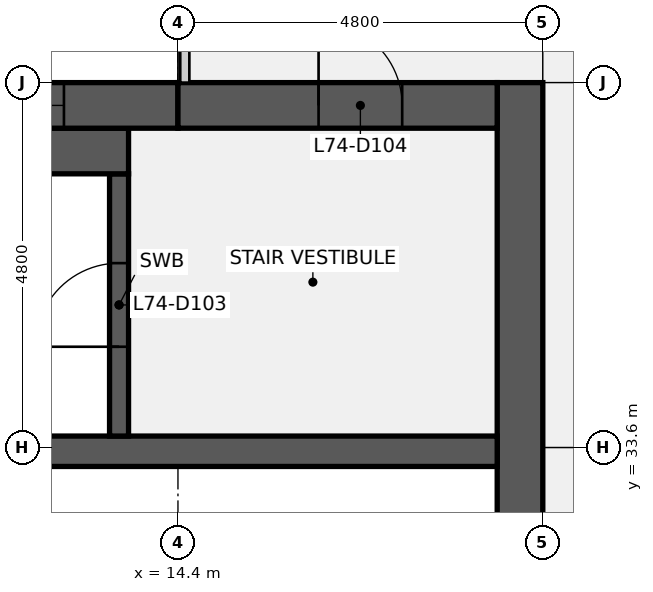
"""IFC4 building model, lengths in metres.
Left out: names, types, materials, properties, quantities, classifications, styles, units other than length and angle.
Written with IfcOpenShell. Run it as: python <this file> out.ifc"""

import sys

from ifc_helpers import new_model, si_unit, direction, frame, frame_2d, origin, place, context, subcontext, project, spatial, rectangle, extrude, element, fill, save


model = new_model("IFC4")
c1 = context("Model", 3, precision=1e-05, world=origin(), true_north=direction((0.0, 1.0)))
c2 = subcontext(c1, "Body", "Model", "MODEL_VIEW")
j1 = project(units=[si_unit("LENGTHUNIT", "METRE"), si_unit("PLANEANGLEUNIT", "RADIAN")], contexts=[c1])
p1 = place(None, origin())
s1 = spatial("IfcSite", under=j1, at=p1, CompositionType="ELEMENT")
p2 = place(p1, origin())
s2 = spatial("IfcBuilding", under=s1, at=p2, CompositionType="ELEMENT")
p3 = place(p2, frame((0.0, 0.0, 334.3)))
s3 = spatial("IfcBuildingStorey", under=s2, at=p3, CompositionType="ELEMENT", Elevation=334.3)
p4 = place(p3, frame((18.9, 38.4, 0.0), z_axis=(0.0, 0.0, 1.0), x_axis=(0.0, -1.0, 0.0)))
e1 = element("IfcWall", 1, at=p4, inside=s3, PredefinedType="SHEAR", context=c2, shape_type="SweptSolid", body=[
    extrude(rectangle(XDim=28.8, YDim=0.6, at=frame_2d((14.4, 0.0))), origin(), (0.0, 0.0, 1.0), 3.84),
])
p5 = place(p4, frame((18.3, 0.0, 0.0)))
e2 = element("IfcOpeningElement", 2, at=p5, cuts=e1, PredefinedType="OPENING", context=c2, shape_type="SweptSolid", body=[
    extrude(rectangle(XDim=1.8, YDim=2.1, at=frame_2d((0.9, 1.05))), frame((0.0, 0.31, 0.0), z_axis=(0.0, -1.0, 0.0), x_axis=(1.0, 0.0, 0.0)), (0.0, 0.0, 1.0), 0.62),
])
p6 = place(p4, frame((8.7, 0.0, 0.0)))
e3 = element("IfcOpeningElement", 3, at=p6, cuts=e1, PredefinedType="OPENING", context=c2, shape_type="SweptSolid", body=[
    extrude(rectangle(XDim=1.8, YDim=2.1, at=frame_2d((0.9, 1.05))), frame((0.0, 0.31, 0.0), z_axis=(0.0, -1.0, 0.0), x_axis=(1.0, 0.0, 0.0)), (0.0, 0.0, 1.0), 0.62),
])
p7 = place(p3, frame((0.6, 33.55, 0.0), z_axis=(0.0, 0.0, 1.0), x_axis=(1.0, 0.0, 0.0)))
e4 = element("IfcWall", 4, at=p7, inside=s3, PredefinedType="SHEAR", context=c2, shape_type="SweptSolid", body=[
    extrude(rectangle(XDim=18.0, YDim=0.4, at=frame_2d((9.0, 0.0))), origin(), (0.0, 0.0, 1.0), 3.84),
])
p8 = place(p3, frame((13.625, 33.75, 0.0), z_axis=(0.0, 0.0, 1.0), x_axis=(0.0, 1.0, 0.0)))
e5 = element("IfcWall", 5, at=p8, inside=s3, PredefinedType="SHEAR", context=c2, shape_type="SweptSolid", body=[
    extrude(rectangle(XDim=3.45, YDim=0.25, at=frame_2d((1.725, 0.0))), origin(), (0.0, 0.0, 1.0), 3.84),
])
p9 = place(p8, frame((1.175, 0.0, 0.0)))
e6 = element("IfcOpeningElement", 6, at=p9, cuts=e5, PredefinedType="OPENING", context=c2, shape_type="SweptSolid", body=[
    extrude(rectangle(XDim=1.1, YDim=2.1, at=frame_2d((0.55, 1.05))), frame((0.0, 0.135, 0.0), z_axis=(0.0, -1.0, 0.0), x_axis=(1.0, 0.0, 0.0)), (0.0, 0.0, 1.0), 0.27),
])
p10 = place(p3, frame((6.25, 37.5, 0.0), z_axis=(0.0, 0.0, 1.0), x_axis=(1.0, 0.0, 0.0)))
e7 = element("IfcWall", 7, at=p10, inside=s3, PredefinedType="SHEAR", context=c2, shape_type="SweptSolid", body=[
    extrude(rectangle(XDim=7.5, YDim=0.6, at=frame_2d((3.75, 0.0))), origin(), (0.0, 0.0, 1.0), 3.84),
])
p11 = place(p3, frame((0.6, 38.1, 0.0), z_axis=(0.0, 0.0, 1.0), x_axis=(1.0, 0.0, 0.0)))
e8 = element("IfcWall", 8, at=p11, inside=s3, PredefinedType="SHEAR", context=c2, shape_type="SweptSolid", body=[
    extrude(rectangle(XDim=13.8, YDim=0.6, at=frame_2d((6.9, 0.0))), origin(), (0.0, 0.0, 1.0), 3.84),
])
p12 = place(p11, frame((5.7, 0.0, 0.9)))
e9 = element("IfcOpeningElement", 9, at=p12, cuts=e8, PredefinedType="OPENING", context=c2, shape_type="SweptSolid", body=[
    extrude(rectangle(XDim=1.8, YDim=1.5, at=frame_2d((0.9, 0.75))), frame((0.0, 0.31, 0.0), z_axis=(0.0, -1.0, 0.0), x_axis=(1.0, 0.0, 0.0)), (0.0, 0.0, 1.0), 0.62),
])
p13 = place(p11, frame((10.5, 0.0, 0.9)))
e10 = element("IfcOpeningElement", 10, at=p13, cuts=e8, PredefinedType="OPENING", context=c2, shape_type="SweptSolid", body=[
    extrude(rectangle(XDim=1.8, YDim=1.5, at=frame_2d((0.9, 0.75))), frame((0.0, 0.31, 0.0), z_axis=(0.0, -1.0, 0.0), x_axis=(1.0, 0.0, 0.0)), (0.0, 0.0, 1.0), 0.62),
])
p14 = place(p3, frame((14.4, 38.1, 0.0), z_axis=(0.0, 0.0, 1.0), x_axis=(1.0, 0.0, 0.0)))
e11 = element("IfcWall", 11, at=p14, inside=s3, PredefinedType="SHEAR", context=c2, shape_type="SweptSolid", body=[
    extrude(rectangle(XDim=4.2, YDim=0.6, at=frame_2d((2.1, 0.0))), origin(), (0.0, 0.0, 1.0), 3.84),
])
p15 = place(p14, frame((1.85, 0.0, 0.0)))
e12 = element("IfcOpeningElement", 12, at=p15, cuts=e11, PredefinedType="OPENING", context=c2, shape_type="SweptSolid", body=[
    extrude(rectangle(XDim=1.1, YDim=2.1, at=frame_2d((0.55, 1.05))), frame((0.0, 0.31, 0.0), z_axis=(0.0, -1.0, 0.0), x_axis=(1.0, 0.0, 0.0)), (0.0, 0.0, 1.0), 0.62),
])
p16 = place(p9, origin())
e13 = element("IfcDoor", 13, at=p16, inside=s3, OperationType="SINGLE_SWING_LEFT", PredefinedType="DOOR", context=c2, shape_type="SweptSolid", body=[
    extrude(rectangle(XDim=1.1, YDim=2.1, at=frame_2d((0.55, 1.05))), frame((0.0, 0.025, 0.0), z_axis=(0.0, -1.0, 0.0), x_axis=(1.0, 0.0, 0.0)), (0.0, 0.0, 1.0), 0.05),
])
fill(e6, e13)
p17 = place(p15, origin())
e14 = element("IfcDoor", 14, at=p17, inside=s3, OperationType="SINGLE_SWING_LEFT", PredefinedType="DOOR", context=c2, shape_type="SweptSolid", body=[
    extrude(rectangle(XDim=1.1, YDim=2.1, at=frame_2d((0.55, 1.05))), frame((0.0, 0.025, 0.0), z_axis=(0.0, -1.0, 0.0), x_axis=(1.0, 0.0, 0.0)), (0.0, 0.0, 1.0), 0.05),
])
fill(e12, e14)
p18 = place(p13, origin())
e15 = element("IfcWindow", 15, at=p18, inside=s3, PartitioningType="SINGLE_PANEL", PredefinedType="WINDOW", context=c2, shape_type="SweptSolid", body=[
    extrude(rectangle(XDim=1.8, YDim=1.5, at=frame_2d((0.9, 0.75))), frame((0.0, 0.03, 0.0), z_axis=(0.0, -1.0, 0.0), x_axis=(1.0, 0.0, 0.0)), (0.0, 0.0, 1.0), 0.06),
])
fill(e10, e15)
save(model, sys.argv[1])
